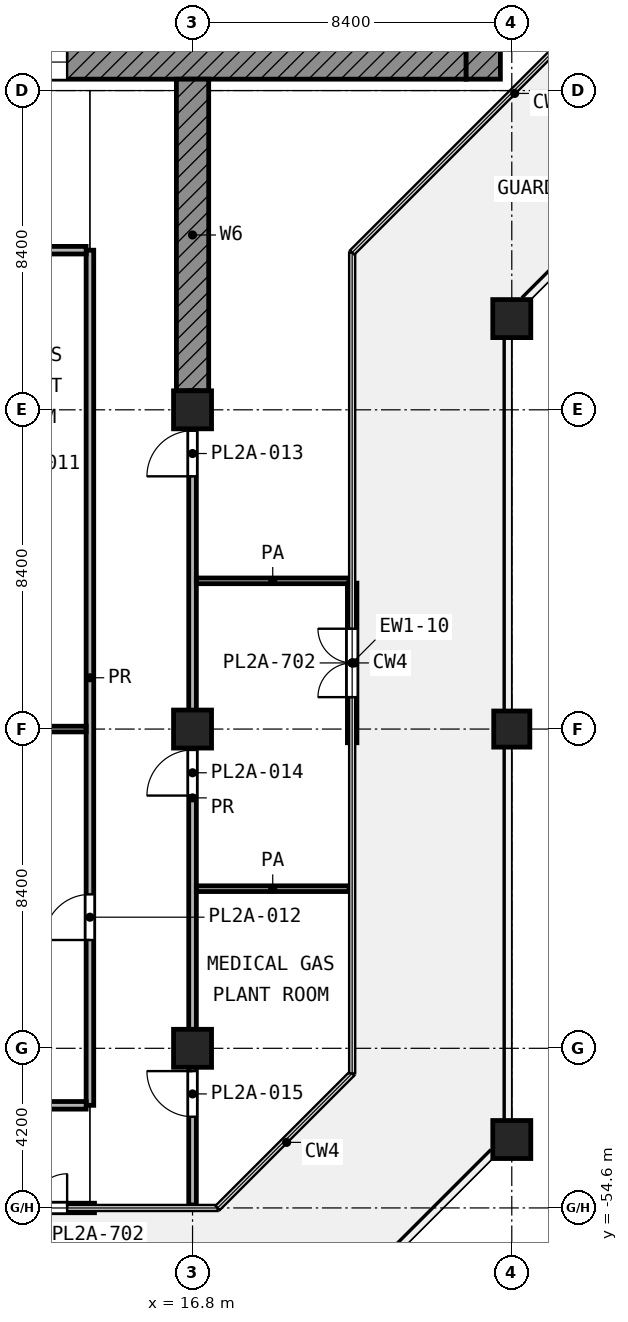
"""IFC4 building model, lengths in metres.
Left out: names, types, materials, properties, quantities, classifications, styles, units other than length and angle.
Written with IfcOpenShell. Run it as: python <this file> out.ifc"""

import sys

from ifc_helpers import new_model, si_unit, direction, frame, frame_2d, origin, origin_2d, place, context, subcontext, project, spatial, rectangle, extrude, element, fill, save


model = new_model("IFC4")
c1 = context("Model", 3, precision=1e-05, world=origin(), true_north=direction((0.0, 1.0)))
c2 = subcontext(c1, "Body", "Model", "MODEL_VIEW")
j1 = project(units=[si_unit("LENGTHUNIT", "METRE"), si_unit("PLANEANGLEUNIT", "RADIAN")], contexts=[c1])
p1 = place(None, origin())
s1 = spatial("IfcSite", under=j1, at=p1, CompositionType="ELEMENT")
p2 = place(p1, origin())
s2 = spatial("IfcBuilding", under=s1, at=p2, CompositionType="ELEMENT")
p3 = place(p2, frame((0.0, 0.0, 153.4)))
s3 = spatial("IfcBuildingStorey", under=s2, at=p3, CompositionType="ELEMENT", Elevation=153.4)
for number, where, z_axis, x_axis in (
    (1, (25.2, -31.2, 0.0), (0.0, 0.0, 1.0), (1.0, 0.0, 0.0)),
    (2, (16.8, -33.6, 0.0), (0.0, 0.0, 1.0), (1.0, 0.0, 0.0)),
    (3, (16.8, -42.0, 0.0), (0.0, 0.0, 1.0), (1.0, 0.0, 0.0)),
):
    element("IfcColumn", number, at=place(p3, frame(where, z_axis=z_axis, x_axis=x_axis)), inside=s3, PredefinedType="COLUMN", context=c2, shape_type="SweptSolid", body=[
        extrude(rectangle(XDim=1.0, YDim=1.0, at=origin_2d()), origin(), (0.0, 0.0, 1.0), 5.0),
    ])
p4 = place(p3, frame((25.2, -42.0, 0.0), z_axis=(0.0, 0.0, 1.0), x_axis=(1.0, 0.0, 0.0)))
e4 = element("IfcColumn", 4, at=p4, inside=s3, PredefinedType="COLUMN", context=c2, shape_type="SweptSolid", body=[
    extrude(rectangle(XDim=0.95, YDim=0.95, at=origin_2d()), origin(), (0.0, 0.0, 1.0), 5.0),
])
for number, where, z_axis, x_axis in (
    (5, (16.8, -50.4, 0.0), (0.0, 0.0, 1.0), (1.0, 0.0, 0.0)),
    (6, (25.2, -52.8, 0.0), (0.0, 0.0, 1.0), (1.0, 0.0, 0.0)),
):
    element("IfcColumn", number, at=place(p3, frame(where, z_axis=z_axis, x_axis=x_axis)), inside=s3, PredefinedType="COLUMN", context=c2, shape_type="SweptSolid", body=[
        extrude(rectangle(XDim=1.0, YDim=1.0, at=origin_2d()), origin(), (0.0, 0.0, 1.0), 5.0),
    ])
p5 = place(p3, frame((16.8, -24.9, 0.0), z_axis=(0.0, 0.0, 1.0), x_axis=(0.0, -1.0, 0.0)))
e7 = element("IfcWall", 7, at=p5, inside=s3, PredefinedType="SHEAR", context=c2, shape_type="SweptSolid", body=[
    extrude(rectangle(XDim=8.2, YDim=0.85, at=frame_2d((4.1, 0.0))), origin(), (0.0, 0.0, 1.0), 4.4),
])
p6 = place(p3, frame((10.98, -54.601, 0.0), z_axis=(0.0, 0.0, 1.0), x_axis=(1.0, 0.0, 0.0)))
e8 = element("IfcWall", 8, at=p6, inside=s3, PredefinedType="SOLIDWALL", context=c2, shape_type="SweptSolid", body=[
    extrude(rectangle(XDim=3.24, YDim=0.25, at=frame_2d((1.62, 0.0))), origin(), (0.0, 0.0, 1.0), 4.24),
])
p7 = place(p6, frame((0.72, 0.0, 0.0)))
e9 = element("IfcOpeningElement", 9, at=p7, cuts=e8, PredefinedType="OPENING", context=c2, shape_type="SweptSolid", body=[
    extrude(rectangle(XDim=1.8, YDim=2.1, at=frame_2d((0.9, 1.05))), frame((0.0, 0.135, 0.0), z_axis=(0.0, -1.0, 0.0), x_axis=(1.0, 0.0, 0.0)), (0.0, 0.0, 1.0), 0.27),
])
p8 = place(p3, frame((21.0, -42.36, 0.0), z_axis=(0.0, 0.0, 1.0), x_axis=(0.0, 1.0, 0.0)))
e10 = element("IfcWall", 10, at=p8, inside=s3, PredefinedType="SOLIDWALL", context=c2, shape_type="SweptSolid", body=[
    extrude(rectangle(XDim=4.2, YDim=0.25, at=frame_2d((2.1, 0.0))), origin(), (0.0, 0.0, 1.0), 4.24),
])
p9 = place(p8, frame((1.2, 0.0, 0.0)))
e11 = element("IfcOpeningElement", 11, at=p9, cuts=e10, PredefinedType="OPENING", context=c2, shape_type="SweptSolid", body=[
    extrude(rectangle(XDim=1.8, YDim=2.1, at=frame_2d((0.9, 1.05))), frame((0.0, 0.135, 0.0), z_axis=(0.0, -1.0, 0.0), x_axis=(1.0, 0.0, 0.0)), (0.0, 0.0, 1.0), 0.27),
])
p10 = place(p3, frame((5.4, -24.45, 0.0), z_axis=(0.0, 0.0, 1.0), x_axis=(1.0, 0.0, 0.0)))
e12 = element("IfcWall", 12, at=p10, inside=s3, PredefinedType="SHEAR", context=c2, shape_type="SweptSolid", body=[
    extrude(rectangle(XDim=18.6, YDim=0.9, at=frame_2d((9.3, 0.0))), origin(), (0.0, 0.0, 1.0), 4.4),
])
p11 = place(p10, frame((6.3, 0.0, 0.0)))
e13 = element("IfcOpeningElement", 13, at=p11, cuts=e12, PredefinedType="OPENING", context=c2, shape_type="SweptSolid", body=[
    extrude(rectangle(XDim=1.8, YDim=2.1, at=frame_2d((0.9, 1.05))), frame((0.0, 0.46, 0.0), z_axis=(0.0, -1.0, 0.0), x_axis=(1.0, 0.0, 0.0)), (0.0, 0.0, 1.0), 0.92),
])
p12 = place(p3, frame((24.45, -24.9, 0.0), z_axis=(0.0, 0.0, 1.0), x_axis=(0.0, 1.0, 0.0)))
e14 = element("IfcWall", 14, at=p12, inside=s3, PredefinedType="SHEAR", context=c2, shape_type="SweptSolid", body=[
    extrude(rectangle(XDim=0.9, YDim=0.9, at=frame_2d((0.45, 0.0))), origin(), (0.0, 0.0, 1.0), 4.4),
])
p13 = place(p3, frame((16.9, -46.2, 0.0), z_axis=(0.0, 0.0, 1.0), x_axis=(1.0, 0.0, 0.0)))
e15 = element("IfcWall", 15, at=p13, inside=s3, PredefinedType="PARTITIONING", context=c2, shape_type="SweptSolid", body=[
    extrude(rectangle(XDim=4.02, YDim=0.15, at=frame_2d((2.01, 0.0))), origin(), (0.0, 0.0, 1.0), 4.4),
])
p14 = place(p3, frame((11.2, -42.0, 0.0), z_axis=(0.0, 0.0, 1.0), x_axis=(1.0, 0.0, 0.0)))
e16 = element("IfcWall", 16, at=p14, inside=s3, PredefinedType="PARTITIONING", context=c2, shape_type="SweptSolid", body=[
    extrude(rectangle(XDim=2.8, YDim=0.15, at=frame_2d((1.4, 0.0))), origin(), (0.0, 0.0, 1.0), 4.4),
])
p15 = place(p3, frame((16.9, -38.1, 0.0), z_axis=(0.0, 0.0, 1.0), x_axis=(1.0, 0.0, 0.0)))
e17 = element("IfcWall", 17, at=p15, inside=s3, PredefinedType="PARTITIONING", context=c2, shape_type="SweptSolid", body=[
    extrude(rectangle(XDim=4.02, YDim=0.15, at=frame_2d((2.01, 0.0))), origin(), (0.0, 0.0, 1.0), 4.4),
])
for number, where, z_axis, x_axis in (
    (18, (11.203, -51.9, 0.0), (0.0, 0.0, 1.0), (1.0, 0.0, 0.0)),
    (19, (11.203, -29.4, 0.0), (0.0, 0.0, 1.0), (1.0, 0.0, 0.0)),
):
    element("IfcWall", number, at=place(p3, frame(where, z_axis=z_axis, x_axis=x_axis)), inside=s3, PredefinedType="PARTITIONING", context=c2, shape_type="SweptSolid", body=[
        extrude(rectangle(XDim=2.797, YDim=0.2, at=frame_2d((1.398, 0.0))), origin(), (0.0, 0.0, 1.0), 4.4),
    ])
p16 = place(p3, frame((14.1, -51.9, 0.0), z_axis=(0.0, 0.0, 1.0), x_axis=(0.0, 1.0, 0.0)))
e20 = element("IfcWall", 20, at=p16, inside=s3, PredefinedType="PARTITIONING", context=c2, shape_type="SweptSolid", body=[
    extrude(rectangle(XDim=22.5, YDim=0.2, at=frame_2d((11.25, 0.0))), origin(), (0.0, 0.0, 1.0), 4.4),
])
p17 = place(p16, frame((4.35, 0.0, 0.0)))
e21 = element("IfcOpeningElement", 21, at=p17, cuts=e20, PredefinedType="OPENING", context=c2, shape_type="SweptSolid", body=[
    extrude(rectangle(XDim=1.2, YDim=2.1, at=frame_2d((0.6, 1.05))), frame((0.0, 0.11, 0.0), z_axis=(0.0, -1.0, 0.0), x_axis=(1.0, 0.0, 0.0)), (0.0, 0.0, 1.0), 0.22),
])
p18 = place(p3, frame((16.8, -54.521, 0.0), z_axis=(0.0, 0.0, 1.0), x_axis=(0.0, 1.0, 0.0)))
e22 = element("IfcWall", 22, at=p18, inside=s3, PredefinedType="PARTITIONING", context=c2, shape_type="SweptSolid", body=[
    extrude(rectangle(XDim=21.421, YDim=0.2, at=frame_2d((10.71, 0.0))), origin(), (0.0, 0.0, 1.0), 4.4),
])
p19 = place(p18, frame((19.171, 0.0, 0.0)))
e23 = element("IfcOpeningElement", 23, at=p19, cuts=e22, PredefinedType="OPENING", context=c2, shape_type="SweptSolid", body=[
    extrude(rectangle(XDim=1.2, YDim=2.1, at=frame_2d((0.6, 1.05))), frame((0.0, 0.11, 0.0), z_axis=(0.0, -1.0, 0.0), x_axis=(1.0, 0.0, 0.0)), (0.0, 0.0, 1.0), 0.22),
])
p20 = place(p18, frame((10.771, 0.0, 0.0)))
e24 = element("IfcOpeningElement", 24, at=p20, cuts=e22, PredefinedType="OPENING", context=c2, shape_type="SweptSolid", body=[
    extrude(rectangle(XDim=1.2, YDim=2.1, at=frame_2d((0.6, 1.05))), frame((0.0, 0.11, 0.0), z_axis=(0.0, -1.0, 0.0), x_axis=(1.0, 0.0, 0.0)), (0.0, 0.0, 1.0), 0.22),
])
p21 = place(p18, frame((2.321, 0.0, 0.0)))
e25 = element("IfcOpeningElement", 25, at=p21, cuts=e22, PredefinedType="OPENING", context=c2, shape_type="SweptSolid", body=[
    extrude(rectangle(XDim=1.2, YDim=2.1, at=frame_2d((0.6, 1.05))), frame((0.0, 0.11, 0.0), z_axis=(0.0, -1.0, 0.0), x_axis=(1.0, 0.0, 0.0)), (0.0, 0.0, 1.0), 0.22),
])
p22 = place(p7, origin())
e26 = element("IfcDoor", 26, at=p22, inside=s3, OperationType="DOUBLE_DOOR_SINGLE_SWING", PredefinedType="DOOR", context=c2, shape_type="SweptSolid", body=[
    extrude(rectangle(XDim=1.8, YDim=2.1, at=frame_2d((0.9, 1.05))), frame((0.0, 0.025, 0.0), z_axis=(0.0, -1.0, 0.0), x_axis=(1.0, 0.0, 0.0)), (0.0, 0.0, 1.0), 0.05),
])
fill(e9, e26)
p23 = place(p9, origin())
e27 = element("IfcDoor", 27, at=p23, inside=s3, OperationType="DOUBLE_DOOR_SINGLE_SWING", PredefinedType="DOOR", context=c2, shape_type="SweptSolid", body=[
    extrude(rectangle(XDim=1.8, YDim=2.1, at=frame_2d((0.9, 1.05))), frame((0.0, 0.025, 0.0), z_axis=(0.0, -1.0, 0.0), x_axis=(1.0, 0.0, 0.0)), (0.0, 0.0, 1.0), 0.05),
])
fill(e11, e27)
p24 = place(p11, origin())
e28 = element("IfcDoor", 28, at=p24, inside=s3, OperationType="DOUBLE_DOOR_SINGLE_SWING", PredefinedType="DOOR", context=c2, shape_type="SweptSolid", body=[
    extrude(rectangle(XDim=1.8, YDim=2.1, at=frame_2d((0.9, 1.05))), frame((0.0, 0.025, 0.0), z_axis=(0.0, -1.0, 0.0), x_axis=(1.0, 0.0, 0.0)), (0.0, 0.0, 1.0), 0.05),
])
fill(e13, e28)
p25 = place(p17, origin())
e29 = element("IfcDoor", 29, at=p25, inside=s3, OperationType="SINGLE_SWING_LEFT", PredefinedType="DOOR", context=c2, shape_type="SweptSolid", body=[
    extrude(rectangle(XDim=1.2, YDim=2.1, at=frame_2d((0.6, 1.05))), frame((0.0, 0.025, 0.0), z_axis=(0.0, -1.0, 0.0), x_axis=(1.0, 0.0, 0.0)), (0.0, 0.0, 1.0), 0.05),
])
fill(e21, e29)
p26 = place(p19, origin())
e30 = element("IfcDoor", 30, at=p26, inside=s3, OperationType="SINGLE_SWING_LEFT", PredefinedType="DOOR", context=c2, shape_type="SweptSolid", body=[
    extrude(rectangle(XDim=1.2, YDim=2.1, at=frame_2d((0.6, 1.05))), frame((0.0, 0.025, 0.0), z_axis=(0.0, -1.0, 0.0), x_axis=(1.0, 0.0, 0.0)), (0.0, 0.0, 1.0), 0.05),
])
fill(e23, e30)
p27 = place(p20, origin())
e31 = element("IfcDoor", 31, at=p27, inside=s3, OperationType="SINGLE_SWING_LEFT", PredefinedType="DOOR", context=c2, shape_type="SweptSolid", body=[
    extrude(rectangle(XDim=1.2, YDim=2.1, at=frame_2d((0.6, 1.05))), frame((0.0, 0.025, 0.0), z_axis=(0.0, -1.0, 0.0), x_axis=(1.0, 0.0, 0.0)), (0.0, 0.0, 1.0), 0.05),
])
fill(e24, e31)
p28 = place(p21, origin())
e32 = element("IfcDoor", 32, at=p28, inside=s3, OperationType="SINGLE_SWING_RIGHT", PredefinedType="DOOR", context=c2, shape_type="SweptSolid", body=[
    extrude(rectangle(XDim=1.2, YDim=2.1, at=frame_2d((0.6, 1.05))), frame((0.0, 0.025, 0.0), z_axis=(0.0, -1.0, 0.0), x_axis=(1.0, 0.0, 0.0)), (0.0, 0.0, 1.0), 0.05),
])
fill(e25, e32)
save(model, sys.argv[1])
